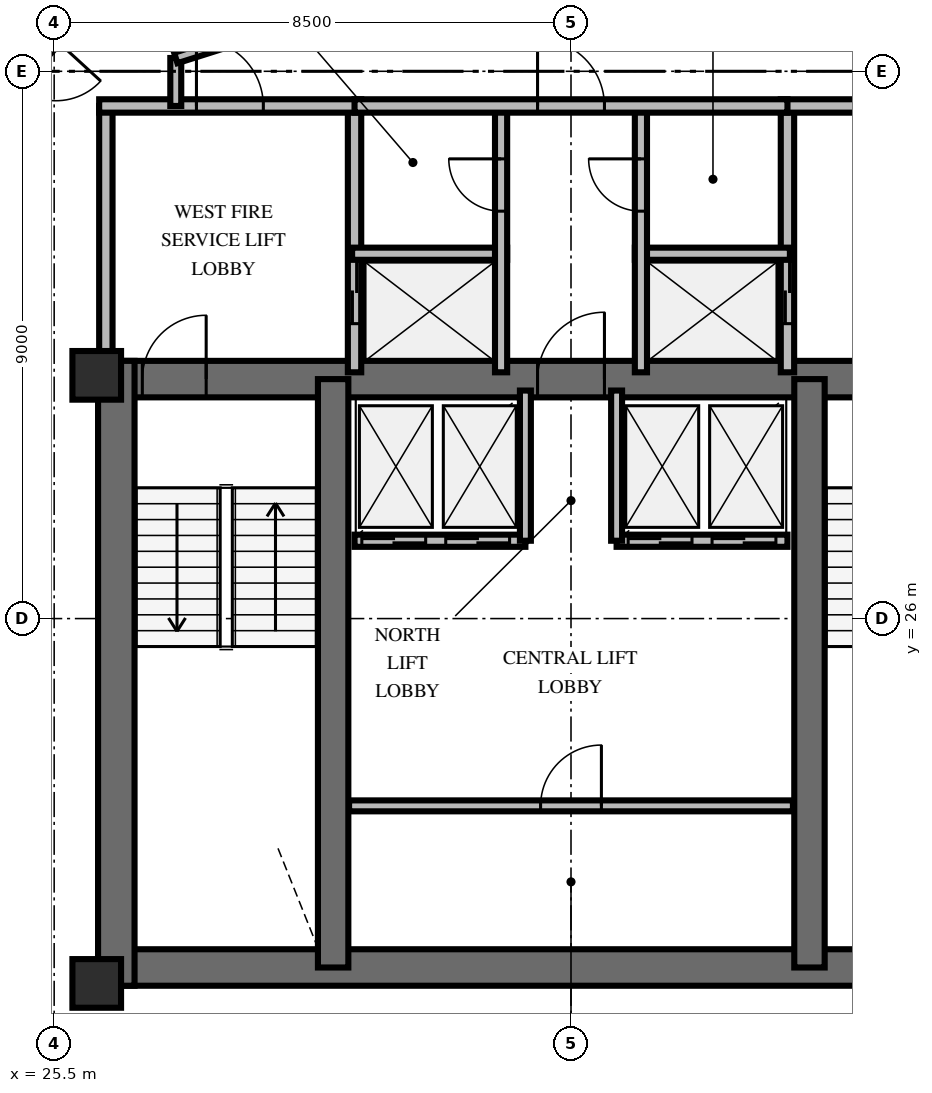
"""IFC4 building model, lengths in metres.
Left out: names, types, materials, properties, quantities, classifications, styles, units other than length and angle.
Written with IfcOpenShell. Run it as: python <this file> out.ifc"""

import sys

from ifc_helpers import new_model, si_unit, direction, frame, frame_2d, origin, origin_2d, place, context, subcontext, project, spatial, rectangle, extrude, element, fill, save


model = new_model("IFC4")
c1 = context("Model", 3, precision=1e-05, world=origin(), true_north=direction((0.0, 1.0)))
c2 = subcontext(c1, "Body", "Model", "MODEL_VIEW")
j1 = project(units=[si_unit("LENGTHUNIT", "METRE"), si_unit("PLANEANGLEUNIT", "RADIAN")], contexts=[c1])
p1 = place(None, origin())
s1 = spatial("IfcSite", under=j1, at=p1, CompositionType="ELEMENT")
p2 = place(p1, origin())
s2 = spatial("IfcBuilding", under=s1, at=p2, CompositionType="ELEMENT")
p3 = place(p2, frame((0.0, 0.0, 230.4)))
s3 = spatial("IfcBuildingStorey", under=s2, at=p3, CompositionType="ELEMENT", Elevation=230.4)
p4 = place(p3, frame((26.222, 20.262, 0.0), z_axis=(0.0, 0.0, 1.0), x_axis=(1.0, 0.0, 0.0)))
e1 = element("IfcWall", 1, at=p4, inside=s3, PredefinedType="SHEAR", context=c2, shape_type="SweptSolid", body=[
    extrude(rectangle(XDim=15.566, YDim=0.6, at=frame_2d((7.783, 0.0))), origin(), (0.0, 0.0, 1.0), 3.6),
])
p5 = place(p3, frame((26.222, 29.938, 0.0), z_axis=(0.0, 0.0, 1.0), x_axis=(1.0, 0.0, 0.0)))
e2 = element("IfcWall", 2, at=p5, inside=s3, PredefinedType="SHEAR", context=c2, shape_type="SweptSolid", body=[
    extrude(rectangle(XDim=15.566, YDim=0.6, at=frame_2d((7.783, 0.0))), origin(), (0.0, 0.0, 1.0), 3.6),
])
p6 = place(p5, frame((0.728, 0.0, 0.0)))
e3 = element("IfcOpeningElement", 3, at=p6, cuts=e2, PredefinedType="OPENING", context=c2, shape_type="SweptSolid", body=[
    extrude(rectangle(XDim=1.05, YDim=2.15, at=frame_2d((0.525, 1.075))), frame((0.0, 0.31, 0.0), z_axis=(0.0, -1.0, 0.0), x_axis=(1.0, 0.0, 0.0)), (0.0, 0.0, 1.0), 0.62),
])
p7 = place(p5, frame((13.778, 0.0, 0.0)))
e4 = element("IfcOpeningElement", 4, at=p7, cuts=e2, PredefinedType="OPENING", context=c2, shape_type="SweptSolid", body=[
    extrude(rectangle(XDim=1.05, YDim=2.15, at=frame_2d((0.525, 1.075))), frame((0.0, 0.31, 0.0), z_axis=(0.0, -1.0, 0.0), x_axis=(1.0, 0.0, 0.0)), (0.0, 0.0, 1.0), 0.62),
])
p8 = place(p5, frame((7.228, 0.0, 0.0)))
e5 = element("IfcOpeningElement", 5, at=p8, cuts=e2, PredefinedType="OPENING", context=c2, shape_type="SweptSolid", body=[
    extrude(rectangle(XDim=1.1, YDim=2.15, at=frame_2d((0.55, 1.075))), frame((0.0, 0.31, 0.0), z_axis=(0.0, -1.0, 0.0), x_axis=(1.0, 0.0, 0.0)), (0.0, 0.0, 1.0), 0.62),
])
p9 = place(p3, frame((26.522, 19.962, 0.0), z_axis=(0.0, 0.0, 1.0), x_axis=(0.0, 1.0, 0.0)))
e6 = element("IfcWall", 6, at=p9, inside=s3, PredefinedType="SHEAR", context=c2, shape_type="SweptSolid", body=[
    extrude(rectangle(XDim=10.276, YDim=0.6, at=frame_2d((5.138, 0.0))), origin(), (0.0, 0.0, 1.0), 3.6),
])
for number, where, z_axis, x_axis in (
    (7, (30.088, 20.262, 0.0), (0.0, 0.0, 1.0), (0.0, 1.0, 0.0)),
    (8, (37.922, 20.262, 0.0), (0.0, 0.0, 1.0), (0.0, 1.0, 0.0)),
):
    element("IfcWall", number, at=place(p3, frame(where, z_axis=z_axis, x_axis=x_axis)), inside=s3, PredefinedType="SHEAR", context=c2, shape_type="SweptSolid", body=[
        extrude(rectangle(XDim=9.676, YDim=0.5, at=frame_2d((4.838, 0.0))), origin(), (0.0, 0.0, 1.0), 3.6),
    ])
for number, where, z_axis, x_axis in (
    (9, (26.2, 20.0, 0.0), (0.0, 0.0, 1.0), (1.0, 0.0, 0.0)),
    (10, (26.2, 30.0, 0.0), (0.0, 0.0, 1.0), (1.0, 0.0, 0.0)),
):
    element("IfcColumn", number, at=place(p3, frame(where, z_axis=z_axis, x_axis=x_axis)), inside=s3, PredefinedType="PILASTER", context=c2, shape_type="SweptSolid", body=[
        extrude(rectangle(XDim=0.8, YDim=0.8, at=origin_2d()), origin(), (0.0, 0.0, 1.0), 3.6),
    ])
p10 = place(p3, frame((26.35, 30.05, 0.0), z_axis=(0.0, 0.0, 1.0), x_axis=(0.0, 1.0, 0.0)))
e11 = element("IfcWall", 11, at=p10, inside=s3, PredefinedType="SOLIDWALL", context=c2, shape_type="SweptSolid", body=[
    extrude(rectangle(XDim=4.38, YDim=0.22, at=frame_2d((2.19, 0.0))), origin(), (0.0, 0.0, 1.0), 2.46),
])
p11 = place(p3, frame((30.44, 30.05, 0.0), z_axis=(0.0, 0.0, 1.0), x_axis=(0.0, 1.0, 0.0)))
e12 = element("IfcWall", 12, at=p11, inside=s3, PredefinedType="SOLIDWALL", context=c2, shape_type="SweptSolid", body=[
    extrude(rectangle(XDim=4.38, YDim=0.22, at=frame_2d((2.19, 0.0))), origin(), (0.0, 0.0, 1.0), 2.46),
])
p12 = place(p11, frame((0.8, 0.0, 0.0)))
e13 = element("IfcOpeningElement", 13, at=p12, cuts=e12, PredefinedType="OPENING", context=c2, shape_type="SweptSolid", body=[
    extrude(rectangle(XDim=1.05, YDim=2.1, at=frame_2d((0.525, 1.05))), frame((0.0, 0.12, 0.0), z_axis=(0.0, -1.0, 0.0), x_axis=(1.0, 0.0, 0.0)), (0.0, 0.0, 1.0), 0.24),
])
p13 = place(p3, frame((26.24, 34.43, 0.0), z_axis=(0.0, 0.0, 1.0), x_axis=(1.0, 0.0, 0.0)))
e14 = element("IfcWall", 14, at=p13, inside=s3, PredefinedType="SOLIDWALL", context=c2, shape_type="SweptSolid", body=[
    extrude(rectangle(XDim=4.31, YDim=0.22, at=frame_2d((2.155, 0.0))), origin(), (0.0, 0.0, 1.0), 2.46),
])
p14 = place(p13, frame((1.6, 0.0, 0.0)))
e15 = element("IfcOpeningElement", 15, at=p14, cuts=e14, PredefinedType="OPENING", context=c2, shape_type="SweptSolid", body=[
    extrude(rectangle(XDim=1.1, YDim=2.15, at=frame_2d((0.55, 1.075))), frame((0.0, 0.12, 0.0), z_axis=(0.0, -1.0, 0.0), x_axis=(1.0, 0.0, 0.0)), (0.0, 0.0, 1.0), 0.24),
])
p15 = place(p3, frame((30.4, 32.0, 0.0), z_axis=(0.0, 0.0, 1.0), x_axis=(1.0, 0.0, 0.0)))
e16 = element("IfcWall", 16, at=p15, inside=s3, PredefinedType="SOLIDWALL", context=c2, shape_type="SweptSolid", body=[
    extrude(rectangle(XDim=2.55, YDim=0.2, at=frame_2d((1.275, 0.0))), origin(), (0.0, 0.0, 1.0), 2.46),
])
p16 = place(p3, frame((32.85, 30.05, 0.0), z_axis=(0.0, 0.0, 1.0), x_axis=(0.0, 1.0, 0.0)))
e17 = element("IfcWall", 17, at=p16, inside=s3, PredefinedType="SOLIDWALL", context=c2, shape_type="SweptSolid", body=[
    extrude(rectangle(XDim=4.38, YDim=0.2, at=frame_2d((2.19, 0.0))), origin(), (0.0, 0.0, 1.0), 2.46),
])
p17 = place(p16, frame((2.65, 0.0, 0.0)))
e18 = element("IfcOpeningElement", 18, at=p17, cuts=e17, PredefinedType="OPENING", context=c2, shape_type="SweptSolid", body=[
    extrude(rectangle(XDim=0.86, YDim=2.05, at=frame_2d((0.43, 1.025))), frame((0.0, 0.11, 0.0), z_axis=(0.0, -1.0, 0.0), x_axis=(1.0, 0.0, 0.0)), (0.0, 0.0, 1.0), 0.22),
])
p18 = place(p3, frame((37.56, 30.05, 0.0), z_axis=(0.0, 0.0, 1.0), x_axis=(0.0, 1.0, 0.0)))
e19 = element("IfcWall", 19, at=p18, inside=s3, PredefinedType="SOLIDWALL", context=c2, shape_type="SweptSolid", body=[
    extrude(rectangle(XDim=4.38, YDim=0.22, at=frame_2d((2.19, 0.0))), origin(), (0.0, 0.0, 1.0), 2.46),
])
p19 = place(p18, frame((0.8, 0.0, 0.0)))
e20 = element("IfcOpeningElement", 20, at=p19, cuts=e19, PredefinedType="OPENING", context=c2, shape_type="SweptSolid", body=[
    extrude(rectangle(XDim=1.05, YDim=2.1, at=frame_2d((0.525, 1.05))), frame((0.0, 0.12, 0.0), z_axis=(0.0, -1.0, 0.0), x_axis=(1.0, 0.0, 0.0)), (0.0, 0.0, 1.0), 0.24),
])
p20 = place(p3, frame((37.45, 34.43, 0.0), z_axis=(0.0, 0.0, 1.0), x_axis=(1.0, 0.0, 0.0)))
e21 = element("IfcWall", 21, at=p20, inside=s3, PredefinedType="SOLIDWALL", context=c2, shape_type="SweptSolid", body=[
    extrude(rectangle(XDim=4.31, YDim=0.22, at=frame_2d((2.155, 0.0))), origin(), (0.0, 0.0, 1.0), 2.46),
])
p21 = place(p20, frame((1.6, 0.0, 0.0)))
e22 = element("IfcOpeningElement", 22, at=p21, cuts=e21, PredefinedType="OPENING", context=c2, shape_type="SweptSolid", body=[
    extrude(rectangle(XDim=1.1, YDim=2.15, at=frame_2d((0.55, 1.075))), frame((0.0, 0.12, 0.0), z_axis=(0.0, -1.0, 0.0), x_axis=(1.0, 0.0, 0.0)), (0.0, 0.0, 1.0), 0.24),
])
p22 = place(p3, frame((35.05, 32.0, 0.0), z_axis=(0.0, 0.0, 1.0), x_axis=(1.0, 0.0, 0.0)))
e23 = element("IfcWall", 23, at=p22, inside=s3, PredefinedType="SOLIDWALL", context=c2, shape_type="SweptSolid", body=[
    extrude(rectangle(XDim=2.55, YDim=0.2, at=frame_2d((1.275, 0.0))), origin(), (0.0, 0.0, 1.0), 2.46),
])
p23 = place(p3, frame((35.15, 30.05, 0.0), z_axis=(0.0, 0.0, 1.0), x_axis=(0.0, 1.0, 0.0)))
e24 = element("IfcWall", 24, at=p23, inside=s3, PredefinedType="SOLIDWALL", context=c2, shape_type="SweptSolid", body=[
    extrude(rectangle(XDim=4.38, YDim=0.2, at=frame_2d((2.19, 0.0))), origin(), (0.0, 0.0, 1.0), 2.46),
])
p24 = place(p23, frame((2.65, 0.0, 0.0)))
e25 = element("IfcOpeningElement", 25, at=p24, cuts=e24, PredefinedType="OPENING", context=c2, shape_type="SweptSolid", body=[
    extrude(rectangle(XDim=0.86, YDim=2.05, at=frame_2d((0.43, 1.025))), frame((0.0, 0.11, 0.0), z_axis=(0.0, -1.0, 0.0), x_axis=(1.0, 0.0, 0.0)), (0.0, 0.0, 1.0), 0.22),
])
p25 = place(p3, frame((30.44, 34.43, 0.0), z_axis=(0.0, 0.0, 1.0), x_axis=(1.0, 0.0, 0.0)))
e26 = element("IfcWall", 26, at=p25, inside=s3, PredefinedType="SOLIDWALL", context=c2, shape_type="SweptSolid", body=[
    extrude(rectangle(XDim=7.12, YDim=0.22, at=frame_2d((3.56, 0.0))), origin(), (0.0, 0.0, 1.0), 2.46),
])
p26 = place(p25, frame((3.01, 0.0, 0.0)))
e27 = element("IfcOpeningElement", 27, at=p26, cuts=e26, PredefinedType="OPENING", context=c2, shape_type="SweptSolid", body=[
    extrude(rectangle(XDim=1.1, YDim=2.15, at=frame_2d((0.55, 1.075))), frame((0.0, 0.12, 0.0), z_axis=(0.0, -1.0, 0.0), x_axis=(1.0, 0.0, 0.0)), (0.0, 0.0, 1.0), 0.24),
])
p27 = place(p3, frame((30.35, 22.92, 0.0), z_axis=(0.0, 0.0, 1.0), x_axis=(1.0, 0.0, 0.0)))
e28 = element("IfcWall", 28, at=p27, inside=s3, PredefinedType="PARTITIONING", context=c2, shape_type="SweptSolid", body=[
    extrude(rectangle(XDim=7.3, YDim=0.18, at=frame_2d((3.65, 0.0))), origin(), (0.0, 0.0, 1.0), 2.46),
])
p28 = place(p27, frame((3.15, 0.0, 0.0)))
e29 = element("IfcOpeningElement", 29, at=p28, cuts=e28, PredefinedType="OPENING", context=c2, shape_type="SweptSolid", body=[
    extrude(rectangle(XDim=1.0, YDim=2.15, at=frame_2d((0.5, 1.075))), frame((0.0, 0.1, 0.0), z_axis=(0.0, -1.0, 0.0), x_axis=(1.0, 0.0, 0.0)), (0.0, 0.0, 1.0), 0.2),
])
p29 = place(p3, frame((30.44, 27.28, 0.0), z_axis=(0.0, 0.0, 1.0), x_axis=(1.0, 0.0, 0.0)))
e30 = element("IfcWall", 30, at=p29, inside=s3, PredefinedType="SOLIDWALL", context=c2, shape_type="SweptSolid", body=[
    extrude(rectangle(XDim=2.81, YDim=0.2, at=frame_2d((1.405, 0.0))), origin(), (0.0, 0.0, 1.0), 2.46),
])
p30 = place(p29, frame((0.12, 0.0, 0.0)))
e31 = element("IfcOpeningElement", 31, at=p30, cuts=e30, PredefinedType="OPENING", context=c2, shape_type="SweptSolid", body=[
    extrude(rectangle(XDim=1.05, YDim=2.1, at=frame_2d((0.525, 1.05))), frame((0.0, 0.11, 0.0), z_axis=(0.0, -1.0, 0.0), x_axis=(1.0, 0.0, 0.0)), (0.0, 0.0, 1.0), 0.22),
])
p31 = place(p29, frame((1.5, 0.0, 0.0)))
e32 = element("IfcOpeningElement", 32, at=p31, cuts=e30, PredefinedType="OPENING", context=c2, shape_type="SweptSolid", body=[
    extrude(rectangle(XDim=1.05, YDim=2.1, at=frame_2d((0.525, 1.05))), frame((0.0, 0.11, 0.0), z_axis=(0.0, -1.0, 0.0), x_axis=(1.0, 0.0, 0.0)), (0.0, 0.0, 1.0), 0.22),
])
p32 = place(p3, frame((33.25, 27.28, 0.0), z_axis=(0.0, 0.0, 1.0), x_axis=(0.0, 1.0, 0.0)))
e33 = element("IfcWall", 33, at=p32, inside=s3, PredefinedType="SOLIDWALL", context=c2, shape_type="SweptSolid", body=[
    extrude(rectangle(XDim=2.47, YDim=0.18, at=frame_2d((1.235, 0.0))), origin(), (0.0, 0.0, 1.0), 2.46),
])
p33 = place(p3, frame((34.75, 27.28, 0.0), z_axis=(0.0, 0.0, 1.0), x_axis=(1.0, 0.0, 0.0)))
e34 = element("IfcWall", 34, at=p33, inside=s3, PredefinedType="SOLIDWALL", context=c2, shape_type="SweptSolid", body=[
    extrude(rectangle(XDim=2.81, YDim=0.2, at=frame_2d((1.405, 0.0))), origin(), (0.0, 0.0, 1.0), 2.46),
])
p34 = place(p33, frame((0.19, 0.0, 0.0)))
e35 = element("IfcOpeningElement", 35, at=p34, cuts=e34, PredefinedType="OPENING", context=c2, shape_type="SweptSolid", body=[
    extrude(rectangle(XDim=1.05, YDim=2.1, at=frame_2d((0.525, 1.05))), frame((0.0, 0.11, 0.0), z_axis=(0.0, -1.0, 0.0), x_axis=(1.0, 0.0, 0.0)), (0.0, 0.0, 1.0), 0.22),
])
p35 = place(p33, frame((1.57, 0.0, 0.0)))
e36 = element("IfcOpeningElement", 36, at=p35, cuts=e34, PredefinedType="OPENING", context=c2, shape_type="SweptSolid", body=[
    extrude(rectangle(XDim=1.05, YDim=2.1, at=frame_2d((0.525, 1.05))), frame((0.0, 0.11, 0.0), z_axis=(0.0, -1.0, 0.0), x_axis=(1.0, 0.0, 0.0)), (0.0, 0.0, 1.0), 0.22),
])
p36 = place(p3, frame((34.75, 27.28, 0.0), z_axis=(0.0, 0.0, 1.0), x_axis=(0.0, 1.0, 0.0)))
e37 = element("IfcWall", 37, at=p36, inside=s3, PredefinedType="SOLIDWALL", context=c2, shape_type="SweptSolid", body=[
    extrude(rectangle(XDim=2.47, YDim=0.18, at=frame_2d((1.235, 0.0))), origin(), (0.0, 0.0, 1.0), 2.46),
])
p37 = place(p3, frame((27.5, 34.43, 0.0), z_axis=(0.0, 0.0, 1.0), x_axis=(0.0, 1.0, 0.0)))
e38 = element("IfcWall", 38, at=p37, inside=s3, PredefinedType="PARTITIONING", context=c2, shape_type="SweptSolid", body=[
    extrude(rectangle(XDim=0.789, YDim=0.18, at=frame_2d((0.395, 0.0))), origin(), (0.0, 0.0, 1.0), 2.46),
])
p38 = place(p3, frame((27.5, 35.219, 0.0), z_axis=(0.0, 0.0, 1.0), x_axis=(0.953228121756, 0.302251795518, 0.0)))
e39 = element("IfcWall", 39, at=p38, inside=s3, PredefinedType="PARTITIONING", context=c2, shape_type="SweptSolid", body=[
    extrude(rectangle(XDim=6.819, YDim=0.18, at=frame_2d((3.409, 0.0))), origin(), (0.0, 0.0, 1.0), 2.46),
])
p39 = place(p38, frame((2.86, 0.0, 0.0)))
e40 = element("IfcOpeningElement", 40, at=p39, cuts=e39, PredefinedType="OPENING", context=c2, shape_type="SweptSolid", body=[
    extrude(rectangle(XDim=1.1, YDim=2.15, at=frame_2d((0.55, 1.075))), frame((0.0, 0.1, 0.0), z_axis=(0.0, -1.0, 0.0), x_axis=(1.0, 0.0, 0.0)), (0.0, 0.0, 1.0), 0.2),
])
p40 = place(p3, frame((34.0, 37.28, 0.0), z_axis=(0.0, 0.0, 1.0), x_axis=(0.953228121756, -0.302251795518, 0.0)))
e41 = element("IfcWall", 41, at=p40, inside=s3, PredefinedType="PARTITIONING", context=c2, shape_type="SweptSolid", body=[
    extrude(rectangle(XDim=6.819, YDim=0.18, at=frame_2d((3.409, 0.0))), origin(), (0.0, 0.0, 1.0), 2.46),
])
p41 = place(p40, frame((2.86, 0.0, 0.0)))
e42 = element("IfcOpeningElement", 42, at=p41, cuts=e41, PredefinedType="OPENING", context=c2, shape_type="SweptSolid", body=[
    extrude(rectangle(XDim=1.1, YDim=2.15, at=frame_2d((0.55, 1.075))), frame((0.0, 0.1, 0.0), z_axis=(0.0, -1.0, 0.0), x_axis=(1.0, 0.0, 0.0)), (0.0, 0.0, 1.0), 0.2),
])
p42 = place(p3, frame((26.165, 36.21, 0.0), z_axis=(0.0, 0.0, 1.0), x_axis=(-0.675600949954, -0.737267493126, 0.0)))
e43 = element("IfcWall", 43, at=p42, inside=s3, PredefinedType="PARTITIONING", context=c2, shape_type="SweptSolid", body=[
    extrude(rectangle(XDim=4.47, YDim=0.18, at=frame_2d((2.235, 0.0))), origin(), (0.0, 0.0, 1.0), 2.46),
])
p43 = place(p42, frame((0.942, 0.0, 0.0)))
e44 = element("IfcOpeningElement", 44, at=p43, cuts=e43, PredefinedType="OPENING", context=c2, shape_type="SweptSolid", body=[
    extrude(rectangle(XDim=1.0, YDim=2.15, at=frame_2d((0.5, 1.075))), frame((0.0, 0.1, 0.0), z_axis=(0.0, -1.0, 0.0), x_axis=(1.0, 0.0, 0.0)), (0.0, 0.0, 1.0), 0.2),
])
p44 = place(p6, origin())
e45 = element("IfcDoor", 45, at=p44, inside=s3, OperationType="SINGLE_SWING_RIGHT", PredefinedType="DOOR", context=c2, shape_type="SweptSolid", body=[
    extrude(rectangle(XDim=1.05, YDim=2.15, at=frame_2d((0.525, 1.075))), frame((0.0, 0.025, 0.0), z_axis=(0.0, -1.0, 0.0), x_axis=(1.0, 0.0, 0.0)), (0.0, 0.0, 1.0), 0.05),
])
fill(e3, e45)
p45 = place(p8, origin())
e46 = element("IfcDoor", 46, at=p45, inside=s3, OperationType="SINGLE_SWING_RIGHT", PredefinedType="DOOR", context=c2, shape_type="SweptSolid", body=[
    extrude(rectangle(XDim=1.1, YDim=2.15, at=frame_2d((0.55, 1.075))), frame((0.0, 0.025, 0.0), z_axis=(0.0, -1.0, 0.0), x_axis=(1.0, 0.0, 0.0)), (0.0, 0.0, 1.0), 0.05),
])
fill(e5, e46)
p46 = place(p14, origin())
e47 = element("IfcDoor", 47, at=p46, inside=s3, OperationType="SINGLE_SWING_LEFT", PredefinedType="DOOR", context=c2, shape_type="SweptSolid", body=[
    extrude(rectangle(XDim=1.1, YDim=2.15, at=frame_2d((0.55, 1.075))), frame((0.0, 0.025, 0.0), z_axis=(0.0, -1.0, 0.0), x_axis=(1.0, 0.0, 0.0)), (0.0, 0.0, 1.0), 0.05),
])
fill(e15, e47)
p47 = place(p12, origin())
e48 = element("IfcDoor", 48, at=p47, inside=s3, OperationType="DOUBLE_DOOR_SLIDING", PredefinedType="USERDEFINED", context=c2, shape_type="SweptSolid", body=[
    extrude(rectangle(XDim=1.05, YDim=2.1, at=frame_2d((0.525, 1.05))), frame((0.0, 0.025, 0.0), z_axis=(0.0, -1.0, 0.0), x_axis=(1.0, 0.0, 0.0)), (0.0, 0.0, 1.0), 0.05),
])
fill(e13, e48)
p48 = place(p17, origin())
e49 = element("IfcDoor", 49, at=p48, inside=s3, OperationType="SINGLE_SWING_RIGHT", PredefinedType="TRAPDOOR", context=c2, shape_type="SweptSolid", body=[
    extrude(rectangle(XDim=0.86, YDim=2.05, at=frame_2d((0.43, 1.025))), frame((0.0, 0.025, 0.0), z_axis=(0.0, -1.0, 0.0), x_axis=(1.0, 0.0, 0.0)), (0.0, 0.0, 1.0), 0.05),
])
fill(e18, e49)
p49 = place(p19, origin())
e50 = element("IfcDoor", 50, at=p49, inside=s3, OperationType="DOUBLE_DOOR_SLIDING", PredefinedType="USERDEFINED", context=c2, shape_type="SweptSolid", body=[
    extrude(rectangle(XDim=1.05, YDim=2.1, at=frame_2d((0.525, 1.05))), frame((0.0, 0.025, 0.0), z_axis=(0.0, -1.0, 0.0), x_axis=(1.0, 0.0, 0.0)), (0.0, 0.0, 1.0), 0.05),
])
fill(e20, e50)
p50 = place(p24, origin())
e51 = element("IfcDoor", 51, at=p50, inside=s3, OperationType="SINGLE_SWING_RIGHT", PredefinedType="TRAPDOOR", context=c2, shape_type="SweptSolid", body=[
    extrude(rectangle(XDim=0.86, YDim=2.05, at=frame_2d((0.43, 1.025))), frame((0.0, 0.025, 0.0), z_axis=(0.0, -1.0, 0.0), x_axis=(1.0, 0.0, 0.0)), (0.0, 0.0, 1.0), 0.05),
])
fill(e25, e51)
p51 = place(p26, origin())
e52 = element("IfcDoor", 52, at=p51, inside=s3, OperationType="SINGLE_SWING_LEFT", PredefinedType="DOOR", context=c2, shape_type="SweptSolid", body=[
    extrude(rectangle(XDim=1.1, YDim=2.15, at=frame_2d((0.55, 1.075))), frame((0.0, 0.025, 0.0), z_axis=(0.0, -1.0, 0.0), x_axis=(1.0, 0.0, 0.0)), (0.0, 0.0, 1.0), 0.05),
])
fill(e27, e52)
p52 = place(p28, origin())
e53 = element("IfcDoor", 53, at=p52, inside=s3, OperationType="SINGLE_SWING_RIGHT", PredefinedType="DOOR", context=c2, shape_type="SweptSolid", body=[
    extrude(rectangle(XDim=1.0, YDim=2.15, at=frame_2d((0.5, 1.075))), frame((0.0, 0.025, 0.0), z_axis=(0.0, -1.0, 0.0), x_axis=(1.0, 0.0, 0.0)), (0.0, 0.0, 1.0), 0.05),
])
fill(e29, e53)
p53 = place(p30, origin())
e54 = element("IfcDoor", 54, at=p53, inside=s3, OperationType="DOUBLE_DOOR_SLIDING", PredefinedType="USERDEFINED", context=c2, shape_type="SweptSolid", body=[
    extrude(rectangle(XDim=1.05, YDim=2.1, at=frame_2d((0.525, 1.05))), frame((0.0, 0.025, 0.0), z_axis=(0.0, -1.0, 0.0), x_axis=(1.0, 0.0, 0.0)), (0.0, 0.0, 1.0), 0.05),
])
fill(e31, e54)
p54 = place(p31, origin())
e55 = element("IfcDoor", 55, at=p54, inside=s3, OperationType="DOUBLE_DOOR_SLIDING", PredefinedType="USERDEFINED", context=c2, shape_type="SweptSolid", body=[
    extrude(rectangle(XDim=1.05, YDim=2.1, at=frame_2d((0.525, 1.05))), frame((0.0, 0.025, 0.0), z_axis=(0.0, -1.0, 0.0), x_axis=(1.0, 0.0, 0.0)), (0.0, 0.0, 1.0), 0.05),
])
fill(e32, e55)
p55 = place(p34, origin())
e56 = element("IfcDoor", 56, at=p55, inside=s3, OperationType="DOUBLE_DOOR_SLIDING", PredefinedType="USERDEFINED", context=c2, shape_type="SweptSolid", body=[
    extrude(rectangle(XDim=1.05, YDim=2.1, at=frame_2d((0.525, 1.05))), frame((0.0, 0.025, 0.0), z_axis=(0.0, -1.0, 0.0), x_axis=(1.0, 0.0, 0.0)), (0.0, 0.0, 1.0), 0.05),
])
fill(e35, e56)
p56 = place(p35, origin())
e57 = element("IfcDoor", 57, at=p56, inside=s3, OperationType="DOUBLE_DOOR_SLIDING", PredefinedType="USERDEFINED", context=c2, shape_type="SweptSolid", body=[
    extrude(rectangle(XDim=1.05, YDim=2.1, at=frame_2d((0.525, 1.05))), frame((0.0, 0.025, 0.0), z_axis=(0.0, -1.0, 0.0), x_axis=(1.0, 0.0, 0.0)), (0.0, 0.0, 1.0), 0.05),
])
fill(e36, e57)
p57 = place(p43, origin())
e58 = element("IfcDoor", 58, at=p57, inside=s3, OperationType="SINGLE_SWING_LEFT", PredefinedType="DOOR", context=c2, shape_type="SweptSolid", body=[
    extrude(rectangle(XDim=1.0, YDim=2.15, at=frame_2d((0.5, 1.075))), frame((0.0, 0.025, 0.0), z_axis=(0.0, -1.0, 0.0), x_axis=(1.0, 0.0, 0.0)), (0.0, 0.0, 1.0), 0.05),
])
fill(e44, e58)
save(model, sys.argv[1])
